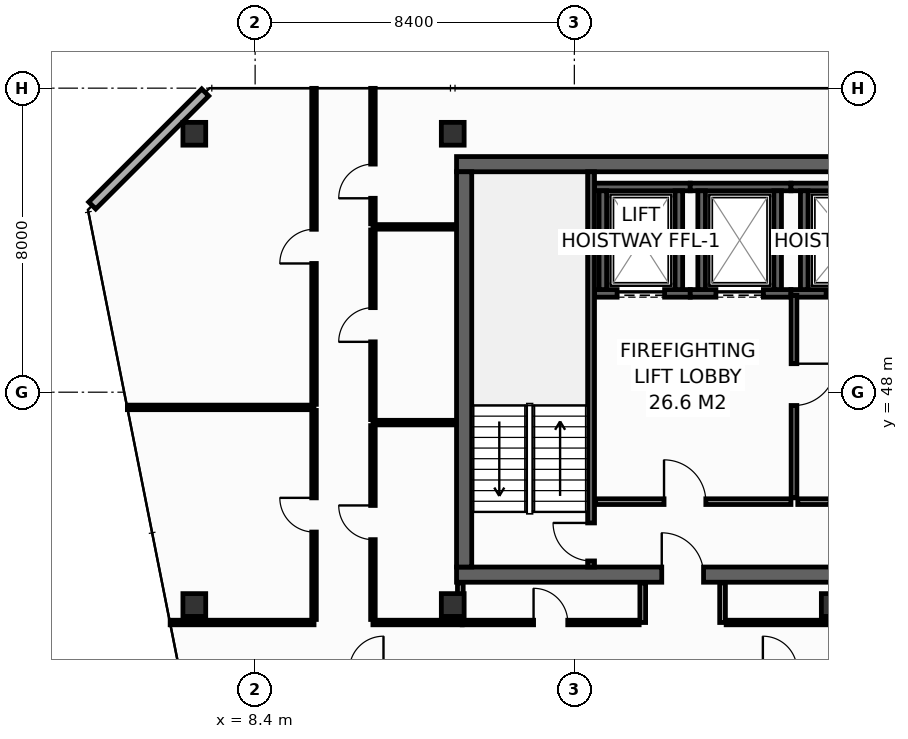
"""IFC4 building model, lengths in metres.
Left out: names, types, materials, properties, quantities, classifications, styles, units other than length and angle.
Written with IfcOpenShell. Run it as: python <this file> out.ifc"""

import sys

from ifc_helpers import new_model, si_unit, direction, frame, frame_2d, origin, origin_2d, place, context, subcontext, project, spatial, rectangle, hollow_rectangle, extrude, element, fill, save


model = new_model("IFC4")
c1 = context("Model", 3, precision=1e-05, world=origin(), true_north=direction((0.0, 1.0)))
c2 = subcontext(c1, "Body", "Model", "MODEL_VIEW")
j1 = project(units=[si_unit("LENGTHUNIT", "METRE"), si_unit("PLANEANGLEUNIT", "RADIAN")], contexts=[c1])
p1 = place(None, origin())
s1 = spatial("IfcSite", under=j1, at=p1, CompositionType="ELEMENT")
p2 = place(p1, origin())
s2 = spatial("IfcBuilding", under=s1, at=p2, CompositionType="ELEMENT")
p3 = place(p2, frame((0.0, 0.0, 302.8)))
s3 = spatial("IfcBuildingStorey", under=s2, at=p3, CompositionType="ELEMENT", Elevation=302.8)
p4 = place(p3, frame((13.7, 43.2, 0.0), z_axis=(0.0, 0.0, 1.0), x_axis=(1.0, 0.0, 0.0)))
e1 = element("IfcWall", 1, at=p4, inside=s3, PredefinedType="SHEAR", context=c2, shape_type="SweptSolid", body=[
    extrude(rectangle(XDim=32.5, YDim=0.4, at=frame_2d((16.25, 0.0))), origin(), (0.0, 0.0, 1.0), 3.55),
])
p5 = place(p4, frame((5.4, 0.0, 0.0)))
e2 = element("IfcOpeningElement", 2, at=p5, cuts=e1, PredefinedType="OPENING", context=c2, shape_type="SweptSolid", body=[
    extrude(rectangle(XDim=1.1, YDim=2.15, at=frame_2d((0.55, 1.075))), frame((0.0, 0.21, 0.0), z_axis=(0.0, -1.0, 0.0), x_axis=(1.0, 0.0, 0.0)), (0.0, 0.0, 1.0), 0.42),
])
p6 = place(p4, frame((25.6, 0.0, 0.0)))
e3 = element("IfcOpeningElement", 3, at=p6, cuts=e1, PredefinedType="OPENING", context=c2, shape_type="SweptSolid", body=[
    extrude(rectangle(XDim=1.1, YDim=2.15, at=frame_2d((0.55, 1.075))), frame((0.0, 0.21, 0.0), z_axis=(0.0, -1.0, 0.0), x_axis=(1.0, 0.0, 0.0)), (0.0, 0.0, 1.0), 0.42),
])
p7 = place(p3, frame((13.7, 54.0, 0.0), z_axis=(0.0, 0.0, 1.0), x_axis=(1.0, 0.0, 0.0)))
e4 = element("IfcWall", 4, at=p7, inside=s3, PredefinedType="SHEAR", context=c2, shape_type="SweptSolid", body=[
    extrude(rectangle(XDim=32.5, YDim=0.4, at=frame_2d((16.25, 0.0))), origin(), (0.0, 0.0, 1.0), 3.55),
])
p8 = place(p3, frame((13.9, 43.4, 0.0), z_axis=(0.0, 0.0, 1.0), x_axis=(0.0, 1.0, 0.0)))
e5 = element("IfcWall", 5, at=p8, inside=s3, PredefinedType="SHEAR", context=c2, shape_type="SweptSolid", body=[
    extrude(rectangle(XDim=10.4, YDim=0.4, at=frame_2d((5.2, 0.0))), origin(), (0.0, 0.0, 1.0), 3.55),
])
for number, where, z_axis, x_axis in (
    (6, (6.8, 54.8, 0.0), (0.0, 0.0, 1.0), (1.0, 0.0, 0.0)),
    (7, (13.6, 54.8, 0.0), (0.0, 0.0, 1.0), (1.0, 0.0, 0.0)),
    (8, (6.8, 42.4, 0.0), (0.0, 0.0, 1.0), (1.0, 0.0, 0.0)),
    (9, (13.6, 42.4, 0.0), (0.0, 0.0, 1.0), (1.0, 0.0, 0.0)),
    (10, (23.6, 42.4, 0.0), (0.0, 0.0, 1.0), (1.0, 0.0, 0.0)),
):
    element("IfcColumn", number, at=place(p3, frame(where, z_axis=z_axis, x_axis=x_axis)), inside=s3, PredefinedType="COLUMN", context=c2, shape_type="SweptSolid", body=[
        extrude(hollow_rectangle(XDim=0.6, YDim=0.6, WallThickness=0.028, at=origin_2d()), origin(), (0.0, 0.0, 1.0), 3.8),
    ])
p9 = place(p3, frame((17.33, 50.6, 0.0), z_axis=(0.0, 0.0, 1.0), x_axis=(1.0, 0.0, 0.0)))
e11 = element("IfcWall", 11, at=p9, inside=s3, PredefinedType="SHEAR", context=c2, shape_type="SweptSolid", body=[
    extrude(rectangle(XDim=2.52, YDim=0.2, at=frame_2d((1.26, 0.0))), origin(), (0.0, 0.0, 1.0), 3.55),
])
p10 = place(p9, frame((0.595, 0.0, 0.0)))
e12 = element("IfcOpeningElement", 12, at=p10, cuts=e11, PredefinedType="OPENING", context=c2, shape_type="SweptSolid", body=[
    extrude(rectangle(XDim=1.25, YDim=2.3, at=frame_2d((0.625, 1.15))), frame((0.0, 0.11, 0.0), z_axis=(0.0, -1.0, 0.0), x_axis=(1.0, 0.0, 0.0)), (0.0, 0.0, 1.0), 0.22),
])
p11 = place(p3, frame((17.33, 53.4, 0.0), z_axis=(0.0, 0.0, 1.0), x_axis=(1.0, 0.0, 0.0)))
e13 = element("IfcWall", 13, at=p11, inside=s3, PredefinedType="SHEAR", context=c2, shape_type="SweptSolid", body=[
    extrude(rectangle(XDim=2.52, YDim=0.2, at=frame_2d((1.26, 0.0))), origin(), (0.0, 0.0, 1.0), 3.55),
])
for number, where, z_axis, x_axis in (
    (14, (17.55, 50.7, 0.0), (0.0, 0.0, 1.0), (0.0, 1.0, 0.0)),
    (15, (19.55, 50.7, 0.0), (0.0, 0.0, 1.0), (0.0, 1.0, 0.0)),
):
    element("IfcWall", number, at=place(p3, frame(where, z_axis=z_axis, x_axis=x_axis)), inside=s3, PredefinedType="SHEAR", context=c2, shape_type="SweptSolid", body=[
        extrude(rectangle(XDim=2.6, YDim=0.2, at=frame_2d((1.3, 0.0))), origin(), (0.0, 0.0, 1.0), 3.55),
    ])
p12 = place(p3, frame((19.85, 50.6, 0.0), z_axis=(0.0, 0.0, 1.0), x_axis=(1.0, 0.0, 0.0)))
e16 = element("IfcWall", 16, at=p12, inside=s3, PredefinedType="SHEAR", context=c2, shape_type="SweptSolid", body=[
    extrude(rectangle(XDim=2.65, YDim=0.2, at=frame_2d((1.325, 0.0))), origin(), (0.0, 0.0, 1.0), 3.55),
])
p13 = place(p12, frame((0.675, 0.0, 0.0)))
e17 = element("IfcOpeningElement", 17, at=p13, cuts=e16, PredefinedType="OPENING", context=c2, shape_type="SweptSolid", body=[
    extrude(rectangle(XDim=1.25, YDim=2.3, at=frame_2d((0.625, 1.15))), frame((0.0, 0.11, 0.0), z_axis=(0.0, -1.0, 0.0), x_axis=(1.0, 0.0, 0.0)), (0.0, 0.0, 1.0), 0.22),
])
p14 = place(p3, frame((19.85, 53.4, 0.0), z_axis=(0.0, 0.0, 1.0), x_axis=(1.0, 0.0, 0.0)))
e18 = element("IfcWall", 18, at=p14, inside=s3, PredefinedType="SHEAR", context=c2, shape_type="SweptSolid", body=[
    extrude(rectangle(XDim=2.65, YDim=0.2, at=frame_2d((1.325, 0.0))), origin(), (0.0, 0.0, 1.0), 3.55),
])
for number, where, z_axis, x_axis in (
    (19, (20.15, 50.7, 0.0), (0.0, 0.0, 1.0), (0.0, 1.0, 0.0)),
    (20, (22.15, 50.7, 0.0), (0.0, 0.0, 1.0), (0.0, 1.0, 0.0)),
):
    element("IfcWall", number, at=place(p3, frame(where, z_axis=z_axis, x_axis=x_axis)), inside=s3, PredefinedType="SHEAR", context=c2, shape_type="SweptSolid", body=[
        extrude(rectangle(XDim=2.6, YDim=0.2, at=frame_2d((1.3, 0.0))), origin(), (0.0, 0.0, 1.0), 3.55),
    ])
p15 = place(p3, frame((22.5, 50.6, 0.0), z_axis=(0.0, 0.0, 1.0), x_axis=(1.0, 0.0, 0.0)))
e21 = element("IfcWall", 21, at=p15, inside=s3, PredefinedType="SHEAR", context=c2, shape_type="SweptSolid", body=[
    extrude(rectangle(XDim=2.85, YDim=0.2, at=frame_2d((1.425, 0.0))), origin(), (0.0, 0.0, 1.0), 3.55),
])
p16 = place(p15, frame((0.925, 0.0, 0.0)))
e22 = element("IfcOpeningElement", 22, at=p16, cuts=e21, PredefinedType="OPENING", context=c2, shape_type="SweptSolid", body=[
    extrude(rectangle(XDim=1.25, YDim=2.3, at=frame_2d((0.625, 1.15))), frame((0.0, 0.11, 0.0), z_axis=(0.0, -1.0, 0.0), x_axis=(1.0, 0.0, 0.0)), (0.0, 0.0, 1.0), 0.22),
])
p17 = place(p3, frame((22.5, 53.4, 0.0), z_axis=(0.0, 0.0, 1.0), x_axis=(1.0, 0.0, 0.0)))
e23 = element("IfcWall", 23, at=p17, inside=s3, PredefinedType="SHEAR", context=c2, shape_type="SweptSolid", body=[
    extrude(rectangle(XDim=2.85, YDim=0.2, at=frame_2d((1.425, 0.0))), origin(), (0.0, 0.0, 1.0), 3.55),
])
p18 = place(p3, frame((22.85, 50.7, 0.0), z_axis=(0.0, 0.0, 1.0), x_axis=(0.0, 1.0, 0.0)))
e24 = element("IfcWall", 24, at=p18, inside=s3, PredefinedType="SHEAR", context=c2, shape_type="SweptSolid", body=[
    extrude(rectangle(XDim=2.6, YDim=0.2, at=frame_2d((1.3, 0.0))), origin(), (0.0, 0.0, 1.0), 3.55),
])
p19 = place(p3, frame((17.24, 43.4, 0.0), z_axis=(0.0, 0.0, 1.0), x_axis=(0.0, 1.0, 0.0)))
e25 = element("IfcWall", 25, at=p19, inside=s3, PredefinedType="SHEAR", context=c2, shape_type="SweptSolid", body=[
    extrude(rectangle(XDim=10.4, YDim=0.18, at=frame_2d((5.2, 0.0))), origin(), (0.0, 0.0, 1.0), 3.55),
])
p20 = place(p19, frame((0.16, 0.0, 0.0)))
e26 = element("IfcOpeningElement", 26, at=p20, cuts=e25, PredefinedType="OPENING", context=c2, shape_type="SweptSolid", body=[
    extrude(rectangle(XDim=1.0, YDim=2.15, at=frame_2d((0.5, 1.075))), frame((0.0, 0.1, 0.0), z_axis=(0.0, -1.0, 0.0), x_axis=(1.0, 0.0, 0.0)), (0.0, 0.0, 1.0), 0.2),
])
p21 = place(p3, frame((17.36, 45.12, 0.0), z_axis=(0.0, 0.0, 1.0), x_axis=(1.0, 0.0, 0.0)))
e27 = element("IfcWall", 27, at=p21, inside=s3, PredefinedType="PARTITIONING", context=c2, shape_type="SweptSolid", body=[
    extrude(rectangle(XDim=5.14, YDim=0.15, at=frame_2d((2.57, 0.0))), origin(), (0.0, 0.0, 1.0), 3.55),
])
p22 = place(p21, frame((1.8, 0.0, 0.0)))
e28 = element("IfcOpeningElement", 28, at=p22, cuts=e27, PredefinedType="OPENING", context=c2, shape_type="SweptSolid", body=[
    extrude(rectangle(XDim=1.1, YDim=2.15, at=frame_2d((0.55, 1.075))), frame((0.0, 0.085, 0.0), z_axis=(0.0, -1.0, 0.0), x_axis=(1.0, 0.0, 0.0)), (0.0, 0.0, 1.0), 0.17),
])
p23 = place(p3, frame((22.58, 50.55, 0.0), z_axis=(0.0, 0.0, 1.0), x_axis=(0.0, -1.0, 0.0)))
e29 = element("IfcWall", 29, at=p23, inside=s3, PredefinedType="PARTITIONING", context=c2, shape_type="SweptSolid", body=[
    extrude(rectangle(XDim=5.33, YDim=0.15, at=frame_2d((2.665, 0.0))), origin(), (0.0, 0.0, 1.0), 3.55),
])
p24 = place(p23, frame((1.8, 0.0, 0.0)))
e30 = element("IfcOpeningElement", 30, at=p24, cuts=e29, PredefinedType="OPENING", context=c2, shape_type="SweptSolid", body=[
    extrude(rectangle(XDim=1.1, YDim=2.15, at=frame_2d((0.55, 1.075))), frame((0.0, 0.085, 0.0), z_axis=(0.0, -1.0, 0.0), x_axis=(1.0, 0.0, 0.0)), (0.0, 0.0, 1.0), 0.17),
])
p25 = place(p3, frame((22.68, 45.12, 0.0), z_axis=(0.0, 0.0, 1.0), x_axis=(1.0, 0.0, 0.0)))
e31 = element("IfcWall", 31, at=p25, inside=s3, PredefinedType="PARTITIONING", context=c2, shape_type="SweptSolid", body=[
    extrude(rectangle(XDim=2.92, YDim=0.15, at=frame_2d((1.46, 0.0))), origin(), (0.0, 0.0, 1.0), 3.55),
])
p26 = place(p25, frame((0.85, 0.0, 0.0)))
e32 = element("IfcOpeningElement", 32, at=p26, cuts=e31, PredefinedType="OPENING", context=c2, shape_type="SweptSolid", body=[
    extrude(rectangle(XDim=1.1, YDim=2.15, at=frame_2d((0.55, 1.075))), frame((0.0, 0.085, 0.0), z_axis=(0.0, -1.0, 0.0), x_axis=(1.0, 0.0, 0.0)), (0.0, 0.0, 1.0), 0.17),
])
p27 = place(p3, frame((7.087, 55.887, 0.0), z_axis=(0.0, 0.0, 1.0), x_axis=(-0.707106781187, -0.707106781187, 0.0)))
e33 = element("IfcWall", 33, at=p27, inside=s3, PredefinedType="STANDARD", context=c2, shape_type="SweptSolid", body=[
    extrude(rectangle(XDim=4.206, YDim=0.26, at=frame_2d((2.103, 0.0))), origin(), (0.0, 0.0, 1.0), 3.55),
])
p28 = place(p3, frame((6.164, 41.94, 0.0), z_axis=(0.0, 0.0, 1.0), x_axis=(1.0, 0.0, 0.0)))
e34 = element("IfcWall", 34, at=p28, inside=s3, PredefinedType="PARTITIONING", context=c2, shape_type="SweptSolid", body=[
    extrude(rectangle(XDim=3.786, YDim=0.12, at=frame_2d((1.893, 0.0))), origin(), (0.0, 0.0, 1.0), 3.085),
])
p29 = place(p3, frame((11.5, 41.94, 0.0), z_axis=(0.0, 0.0, 1.0), x_axis=(1.0, 0.0, 0.0)))
e35 = element("IfcWall", 35, at=p29, inside=s3, PredefinedType="PARTITIONING", context=c2, shape_type="SweptSolid", body=[
    extrude(rectangle(XDim=2.35, YDim=0.12, at=frame_2d((1.175, 0.0))), origin(), (0.0, 0.0, 1.0), 3.55),
])
p30 = place(p3, frame((11.5, 52.35, 0.0), z_axis=(0.0, 0.0, 1.0), x_axis=(1.0, 0.0, 0.0)))
e36 = element("IfcWall", 36, at=p30, inside=s3, PredefinedType="PARTITIONING", context=c2, shape_type="SweptSolid", body=[
    extrude(rectangle(XDim=2.18, YDim=0.12, at=frame_2d((1.09, 0.0))), origin(), (0.0, 0.0, 1.0), 3.55),
])
p31 = place(p3, frame((11.5, 52.43, 0.0), z_axis=(0.0, 0.0, 1.0), x_axis=(0.0, 1.0, 0.0)))
e37 = element("IfcWall", 37, at=p31, inside=s3, PredefinedType="PARTITIONING", context=c2, shape_type="SweptSolid", body=[
    extrude(rectangle(XDim=3.565, YDim=0.12, at=frame_2d((1.783, 0.0))), origin(), (0.0, 0.0, 1.0), 2.935),
])
p32 = place(p31, frame((0.672, 0.0, 0.0)))
e38 = element("IfcOpeningElement", 38, at=p32, cuts=e37, PredefinedType="OPENING", context=c2, shape_type="SweptSolid", body=[
    extrude(rectangle(XDim=0.9, YDim=2.1, at=frame_2d((0.45, 1.05))), frame((0.0, 0.07, 0.0), z_axis=(0.0, -1.0, 0.0), x_axis=(1.0, 0.0, 0.0)), (0.0, 0.0, 1.0), 0.14),
])
p33 = place(p3, frame((5.039, 47.6, 0.0), z_axis=(0.0, 0.0, 1.0), x_axis=(1.0, 0.0, 0.0)))
e39 = element("IfcWall", 39, at=p33, inside=s3, PredefinedType="PARTITIONING", context=c2, shape_type="SweptSolid", body=[
    extrude(rectangle(XDim=4.911, YDim=0.12, at=frame_2d((2.456, 0.0))), origin(), (0.0, 0.0, 1.0), 2.947),
])
p34 = place(p3, frame((9.95, 42.02, 0.0), z_axis=(0.0, 0.0, 1.0), x_axis=(0.0, 1.0, 0.0)))
e40 = element("IfcWall", 40, at=p34, inside=s3, PredefinedType="PARTITIONING", context=c2, shape_type="SweptSolid", body=[
    extrude(rectangle(XDim=5.5, YDim=0.12, at=frame_2d((2.75, 0.0))), origin(), (0.0, 0.0, 1.0), 2.947),
])
p35 = place(p34, frame((2.3, 0.0, 0.0)))
e41 = element("IfcOpeningElement", 41, at=p35, cuts=e40, PredefinedType="OPENING", context=c2, shape_type="SweptSolid", body=[
    extrude(rectangle(XDim=0.9, YDim=2.1, at=frame_2d((0.45, 1.05))), frame((0.0, 0.07, 0.0), z_axis=(0.0, -1.0, 0.0), x_axis=(1.0, 0.0, 0.0)), (0.0, 0.0, 1.0), 0.14),
])
p36 = place(p3, frame((9.95, 47.68, 0.0), z_axis=(0.0, 0.0, 1.0), x_axis=(0.0, 1.0, 0.0)))
e42 = element("IfcWall", 42, at=p36, inside=s3, PredefinedType="PARTITIONING", context=c2, shape_type="SweptSolid", body=[
    extrude(rectangle(XDim=8.315, YDim=0.12, at=frame_2d((4.158, 0.0))), origin(), (0.0, 0.0, 1.0), 2.935),
])
p37 = place(p36, frame((3.707, 0.0, 0.0)))
e43 = element("IfcOpeningElement", 43, at=p37, cuts=e42, PredefinedType="OPENING", context=c2, shape_type="SweptSolid", body=[
    extrude(rectangle(XDim=0.9, YDim=2.1, at=frame_2d((0.45, 1.05))), frame((0.0, 0.07, 0.0), z_axis=(0.0, -1.0, 0.0), x_axis=(1.0, 0.0, 0.0)), (0.0, 0.0, 1.0), 0.14),
])
p38 = place(p3, frame((11.5, 47.2, 0.0), z_axis=(0.0, 0.0, 1.0), x_axis=(1.0, 0.0, 0.0)))
e44 = element("IfcWall", 44, at=p38, inside=s3, PredefinedType="PARTITIONING", context=c2, shape_type="SweptSolid", body=[
    extrude(rectangle(XDim=2.18, YDim=0.12, at=frame_2d((1.09, 0.0))), origin(), (0.0, 0.0, 1.0), 3.55),
])
p39 = place(p3, frame((11.5, 42.02, 0.0), z_axis=(0.0, 0.0, 1.0), x_axis=(0.0, 1.0, 0.0)))
e45 = element("IfcWall", 45, at=p39, inside=s3, PredefinedType="PARTITIONING", context=c2, shape_type="SweptSolid", body=[
    extrude(rectangle(XDim=5.1, YDim=0.12, at=frame_2d((2.55, 0.0))), origin(), (0.0, 0.0, 1.0), 2.947),
])
p40 = place(p39, frame((2.1, 0.0, 0.0)))
e46 = element("IfcOpeningElement", 46, at=p40, cuts=e45, PredefinedType="OPENING", context=c2, shape_type="SweptSolid", body=[
    extrude(rectangle(XDim=0.9, YDim=2.1, at=frame_2d((0.45, 1.05))), frame((0.0, 0.07, 0.0), z_axis=(0.0, -1.0, 0.0), x_axis=(1.0, 0.0, 0.0)), (0.0, 0.0, 1.0), 0.14),
])
p41 = place(p3, frame((11.5, 47.28, 0.0), z_axis=(0.0, 0.0, 1.0), x_axis=(0.0, 1.0, 0.0)))
e47 = element("IfcWall", 47, at=p41, inside=s3, PredefinedType="PARTITIONING", context=c2, shape_type="SweptSolid", body=[
    extrude(rectangle(XDim=4.99, YDim=0.12, at=frame_2d((2.495, 0.0))), origin(), (0.0, 0.0, 1.0), 3.55),
])
p42 = place(p41, frame((2.045, 0.0, 0.0)))
e48 = element("IfcOpeningElement", 48, at=p42, cuts=e47, PredefinedType="OPENING", context=c2, shape_type="SweptSolid", body=[
    extrude(rectangle(XDim=0.9, YDim=2.1, at=frame_2d((0.45, 1.05))), frame((0.0, 0.07, 0.0), z_axis=(0.0, -1.0, 0.0), x_axis=(1.0, 0.0, 0.0)), (0.0, 0.0, 1.0), 0.14),
])
p43 = place(p3, frame((13.8, 42.02, 0.0), z_axis=(0.0, 0.0, 1.0), x_axis=(0.0, 1.0, 0.0)))
e49 = element("IfcWall", 49, at=p43, inside=s3, PredefinedType="PARTITIONING", context=c2, shape_type="SweptSolid", body=[
    extrude(rectangle(XDim=0.96, YDim=0.15, at=frame_2d((0.48, 0.0))), origin(), (0.0, 0.0, 1.0), 3.55),
])
for number, where, z_axis, x_axis in (
    (50, (18.6, 41.94, 0.0), (0.0, 0.0, 1.0), (0.0, 1.0, 0.0)),
    (51, (20.7, 41.94, 0.0), (0.0, 0.0, 1.0), (0.0, 1.0, 0.0)),
):
    element("IfcWall", number, at=place(p3, frame(where, z_axis=z_axis, x_axis=x_axis)), inside=s3, PredefinedType="PARTITIONING", context=c2, shape_type="SweptSolid", body=[
        extrude(rectangle(XDim=1.04, YDim=0.15, at=frame_2d((0.52, 0.0))), origin(), (0.0, 0.0, 1.0), 3.55),
    ])
p44 = place(p3, frame((13.85, 41.94, 0.0), z_axis=(0.0, 0.0, 1.0), x_axis=(1.0, 0.0, 0.0)))
e52 = element("IfcWall", 52, at=p44, inside=s3, PredefinedType="PARTITIONING", context=c2, shape_type="SweptSolid", body=[
    extrude(rectangle(XDim=4.655, YDim=0.12, at=frame_2d((2.327, 0.0))), origin(), (0.0, 0.0, 1.0), 3.55),
])
p45 = place(p44, frame((1.877, 0.0, 0.0)))
e53 = element("IfcOpeningElement", 53, at=p45, cuts=e52, PredefinedType="OPENING", context=c2, shape_type="SweptSolid", body=[
    extrude(rectangle(XDim=0.9, YDim=2.1, at=frame_2d((0.45, 1.05))), frame((0.0, 0.07, 0.0), z_axis=(0.0, -1.0, 0.0), x_axis=(1.0, 0.0, 0.0)), (0.0, 0.0, 1.0), 0.14),
])
p46 = place(p3, frame((20.795, 41.94, 0.0), z_axis=(0.0, 0.0, 1.0), x_axis=(1.0, 0.0, 0.0)))
e54 = element("IfcWall", 54, at=p46, inside=s3, PredefinedType="PARTITIONING", context=c2, shape_type="SweptSolid", body=[
    extrude(rectangle(XDim=17.91, YDim=0.12, at=frame_2d((8.955, 0.0))), origin(), (0.0, 0.0, 1.0), 3.047),
])
p47 = place(p46, frame((8.505, 0.0, 0.0)))
e55 = element("IfcOpeningElement", 55, at=p47, cuts=e54, PredefinedType="OPENING", context=c2, shape_type="SweptSolid", body=[
    extrude(rectangle(XDim=0.9, YDim=2.1, at=frame_2d((0.45, 1.05))), frame((0.0, 0.07, 0.0), z_axis=(0.0, -1.0, 0.0), x_axis=(1.0, 0.0, 0.0)), (0.0, 0.0, 1.0), 0.14),
])
p48 = place(p10, origin())
e56 = element("IfcDoor", 56, at=p48, inside=s3, OperationType="SLIDING_TO_LEFT", PredefinedType="DOOR", context=c2, shape_type="SweptSolid", body=[
    extrude(rectangle(XDim=1.25, YDim=2.3, at=frame_2d((0.625, 1.15))), frame((0.0, 0.025, 0.0), z_axis=(0.0, -1.0, 0.0), x_axis=(1.0, 0.0, 0.0)), (0.0, 0.0, 1.0), 0.05),
])
fill(e12, e56)
p49 = place(p13, origin())
e57 = element("IfcDoor", 57, at=p49, inside=s3, OperationType="SLIDING_TO_LEFT", PredefinedType="DOOR", context=c2, shape_type="SweptSolid", body=[
    extrude(rectangle(XDim=1.25, YDim=2.3, at=frame_2d((0.625, 1.15))), frame((0.0, 0.025, 0.0), z_axis=(0.0, -1.0, 0.0), x_axis=(1.0, 0.0, 0.0)), (0.0, 0.0, 1.0), 0.05),
])
fill(e17, e57)
p50 = place(p16, origin())
e58 = element("IfcDoor", 58, at=p50, inside=s3, OperationType="SLIDING_TO_LEFT", PredefinedType="DOOR", context=c2, shape_type="SweptSolid", body=[
    extrude(rectangle(XDim=1.25, YDim=2.3, at=frame_2d((0.625, 1.15))), frame((0.0, 0.025, 0.0), z_axis=(0.0, -1.0, 0.0), x_axis=(1.0, 0.0, 0.0)), (0.0, 0.0, 1.0), 0.05),
])
fill(e22, e58)
p51 = place(p20, origin())
e59 = element("IfcDoor", 59, at=p51, inside=s3, OperationType="SINGLE_SWING_RIGHT", PredefinedType="DOOR", context=c2, shape_type="SweptSolid", body=[
    extrude(rectangle(XDim=1.0, YDim=2.15, at=frame_2d((0.5, 1.075))), frame((0.0, 0.025, 0.0), z_axis=(0.0, -1.0, 0.0), x_axis=(1.0, 0.0, 0.0)), (0.0, 0.0, 1.0), 0.05),
])
fill(e26, e59)
p52 = place(p22, origin())
e60 = element("IfcDoor", 60, at=p52, inside=s3, OperationType="SINGLE_SWING_LEFT", PredefinedType="DOOR", context=c2, shape_type="SweptSolid", body=[
    extrude(rectangle(XDim=1.1, YDim=2.15, at=frame_2d((0.55, 1.075))), frame((0.0, 0.025, 0.0), z_axis=(0.0, -1.0, 0.0), x_axis=(1.0, 0.0, 0.0)), (0.0, 0.0, 1.0), 0.05),
])
fill(e28, e60)
p53 = place(p24, origin())
e61 = element("IfcDoor", 61, at=p53, inside=s3, OperationType="SINGLE_SWING_LEFT", PredefinedType="DOOR", context=c2, shape_type="SweptSolid", body=[
    extrude(rectangle(XDim=1.1, YDim=2.15, at=frame_2d((0.55, 1.075))), frame((0.0, 0.025, 0.0), z_axis=(0.0, -1.0, 0.0), x_axis=(1.0, 0.0, 0.0)), (0.0, 0.0, 1.0), 0.05),
])
fill(e30, e61)
p54 = place(p5, origin())
e62 = element("IfcDoor", 62, at=p54, inside=s3, OperationType="SINGLE_SWING_LEFT", PredefinedType="DOOR", context=c2, shape_type="SweptSolid", body=[
    extrude(rectangle(XDim=1.1, YDim=2.15, at=frame_2d((0.55, 1.075))), frame((0.0, 0.025, 0.0), z_axis=(0.0, -1.0, 0.0), x_axis=(1.0, 0.0, 0.0)), (0.0, 0.0, 1.0), 0.05),
])
fill(e2, e62)
p55 = place(p32, origin())
e63 = element("IfcDoor", 63, at=p55, inside=s3, OperationType="SINGLE_SWING_LEFT", PredefinedType="DOOR", context=c2, shape_type="SweptSolid", body=[
    extrude(rectangle(XDim=0.9, YDim=2.1, at=frame_2d((0.45, 1.05))), frame((0.0, 0.025, 0.0), z_axis=(0.0, -1.0, 0.0), x_axis=(1.0, 0.0, 0.0)), (0.0, 0.0, 1.0), 0.05),
])
fill(e38, e63)
p56 = place(p35, origin())
e64 = element("IfcDoor", 64, at=p56, inside=s3, OperationType="SINGLE_SWING_RIGHT", PredefinedType="DOOR", context=c2, shape_type="SweptSolid", body=[
    extrude(rectangle(XDim=0.9, YDim=2.1, at=frame_2d((0.45, 1.05))), frame((0.0, 0.025, 0.0), z_axis=(0.0, -1.0, 0.0), x_axis=(1.0, 0.0, 0.0)), (0.0, 0.0, 1.0), 0.05),
])
fill(e41, e64)
p57 = place(p37, origin())
e65 = element("IfcDoor", 65, at=p57, inside=s3, OperationType="SINGLE_SWING_LEFT", PredefinedType="DOOR", context=c2, shape_type="SweptSolid", body=[
    extrude(rectangle(XDim=0.9, YDim=2.1, at=frame_2d((0.45, 1.05))), frame((0.0, 0.025, 0.0), z_axis=(0.0, -1.0, 0.0), x_axis=(1.0, 0.0, 0.0)), (0.0, 0.0, 1.0), 0.05),
])
fill(e43, e65)
p58 = place(p40, origin())
e66 = element("IfcDoor", 66, at=p58, inside=s3, OperationType="SINGLE_SWING_RIGHT", PredefinedType="DOOR", context=c2, shape_type="SweptSolid", body=[
    extrude(rectangle(XDim=0.9, YDim=2.1, at=frame_2d((0.45, 1.05))), frame((0.0, 0.025, 0.0), z_axis=(0.0, -1.0, 0.0), x_axis=(1.0, 0.0, 0.0)), (0.0, 0.0, 1.0), 0.05),
])
fill(e46, e66)
p59 = place(p42, origin())
e67 = element("IfcDoor", 67, at=p59, inside=s3, OperationType="SINGLE_SWING_LEFT", PredefinedType="DOOR", context=c2, shape_type="SweptSolid", body=[
    extrude(rectangle(XDim=0.9, YDim=2.1, at=frame_2d((0.45, 1.05))), frame((0.0, 0.025, 0.0), z_axis=(0.0, -1.0, 0.0), x_axis=(1.0, 0.0, 0.0)), (0.0, 0.0, 1.0), 0.05),
])
fill(e48, e67)
p60 = place(p45, origin())
e68 = element("IfcDoor", 68, at=p60, inside=s3, OperationType="SINGLE_SWING_LEFT", PredefinedType="DOOR", context=c2, shape_type="SweptSolid", body=[
    extrude(rectangle(XDim=0.9, YDim=2.1, at=frame_2d((0.45, 1.05))), frame((0.0, 0.025, 0.0), z_axis=(0.0, -1.0, 0.0), x_axis=(1.0, 0.0, 0.0)), (0.0, 0.0, 1.0), 0.05),
])
fill(e53, e68)
save(model, sys.argv[1])
